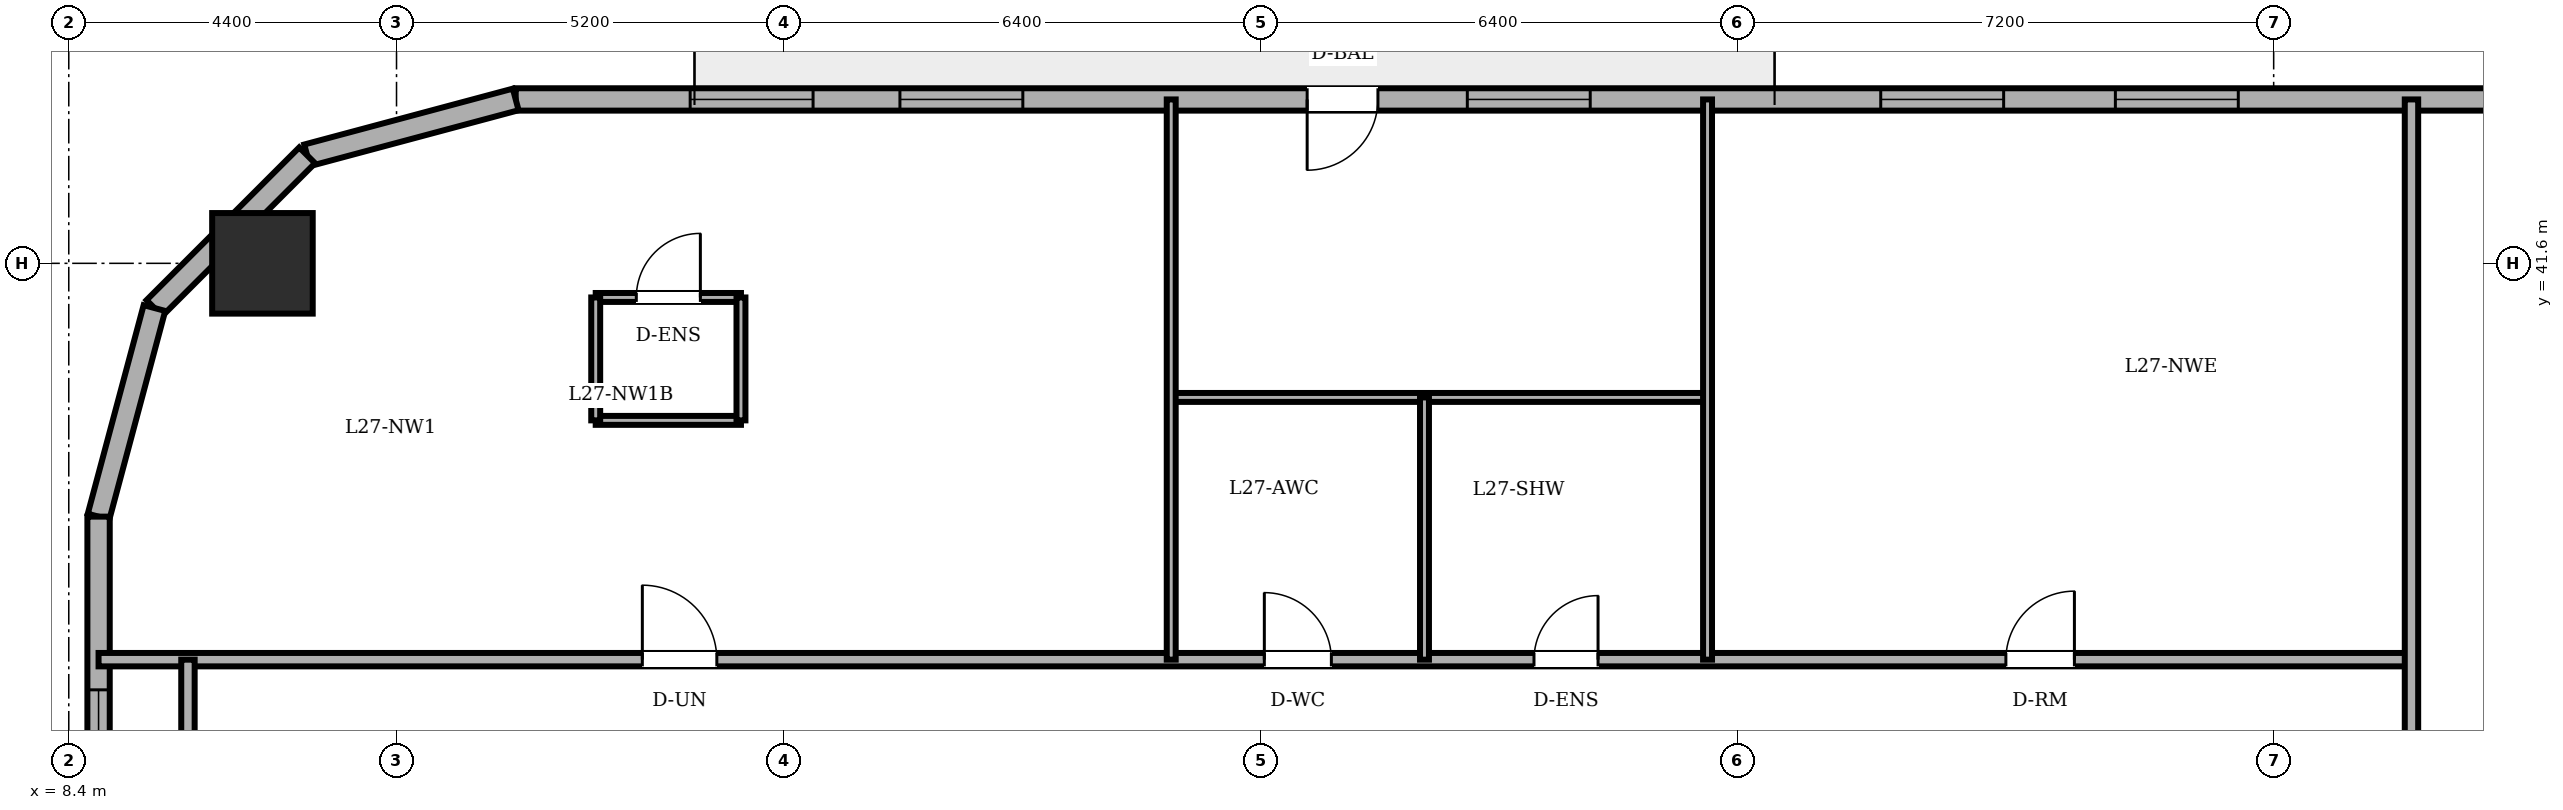
"""IFC4 building model, lengths in metres.
Left out: names, types, materials, properties, quantities, classifications, styles, units other than length and angle.
Written with IfcOpenShell. Run it as: python <this file> out.ifc"""

import sys

from ifc_helpers import new_model, si_unit, direction, frame, frame_2d, origin, origin_2d, place, context, subcontext, project, spatial, rectangle, circle, extrude, element, fill, save


model = new_model("IFC4")
c1 = context("Model", 3, precision=1e-05, world=origin(), true_north=direction((0.0, 1.0)))
c2 = subcontext(c1, "Body", "Model", "MODEL_VIEW")
j1 = project(units=[si_unit("LENGTHUNIT", "METRE"), si_unit("PLANEANGLEUNIT", "RADIAN")], contexts=[c1])
p1 = place(None, origin())
s1 = spatial("IfcSite", under=j1, at=p1, CompositionType="ELEMENT")
p2 = place(p1, origin())
s2 = spatial("IfcBuilding", under=s1, at=p2, CompositionType="ELEMENT")
p3 = place(p2, frame((0.0, 0.0, 104.3)))
s3 = spatial("IfcBuildingStorey", under=s2, at=p3, CompositionType="ELEMENT", Elevation=104.3)
p4 = place(p3, frame((11.0, 41.6, 0.0), z_axis=(0.0, 0.0, 1.0), x_axis=(1.0, 0.0, 0.0)))
e1 = element("IfcColumn", 1, at=p4, inside=s3, PredefinedType="COLUMN", context=c2, shape_type="SweptSolid", body=[
    extrude(circle(Radius=0.675, at=origin_2d()), origin(), (0.0, 0.0, 1.0), 3.6),
])
p5 = place(p3, frame((44.333, 43.8, 0.0), z_axis=(0.0, 0.0, 1.0), x_axis=(-1.0, 0.0, 0.0)))
e2 = element("IfcWall", 2, at=p5, inside=s3, PredefinedType="SOLIDWALL", context=c2, shape_type="SweptSolid", body=[
    extrude(rectangle(XDim=29.933, YDim=0.3, at=frame_2d((14.967, 0.0))), origin(), (0.0, 0.0, 1.0), 3.4),
])
p6 = place(p5, frame((18.358, 0.0, 0.0)))
e3 = element("IfcOpeningElement", 3, at=p6, cuts=e2, PredefinedType="OPENING", context=c2, shape_type="SweptSolid", body=[
    extrude(rectangle(XDim=0.95, YDim=2.2, at=frame_2d((0.475, 1.1))), frame((0.0, 0.16, 0.0), z_axis=(0.0, -1.0, 0.0), x_axis=(1.0, 0.0, 0.0)), (0.0, 0.0, 1.0), 0.32),
])
p7 = place(p5, frame((1.591, 0.0, 0.85)))
e4 = element("IfcOpeningElement", 4, at=p7, cuts=e2, PredefinedType="OPENING", context=c2, shape_type="SweptSolid", body=[
    extrude(rectangle(XDim=1.65, YDim=1.55, at=frame_2d((0.825, 0.775))), frame((0.0, 0.16, 0.0), z_axis=(0.0, -1.0, 0.0), x_axis=(1.0, 0.0, 0.0)), (0.0, 0.0, 1.0), 0.32),
])
p8 = place(p5, frame((6.808, 0.0, 0.85)))
e5 = element("IfcOpeningElement", 5, at=p8, cuts=e2, PredefinedType="OPENING", context=c2, shape_type="SweptSolid", body=[
    extrude(rectangle(XDim=1.65, YDim=1.55, at=frame_2d((0.825, 0.775))), frame((0.0, 0.16, 0.0), z_axis=(0.0, -1.0, 0.0), x_axis=(1.0, 0.0, 0.0)), (0.0, 0.0, 1.0), 0.32),
])
p9 = place(p5, frame((9.958, 0.0, 0.85)))
e6 = element("IfcOpeningElement", 6, at=p9, cuts=e2, PredefinedType="OPENING", context=c2, shape_type="SweptSolid", body=[
    extrude(rectangle(XDim=1.65, YDim=1.55, at=frame_2d((0.825, 0.775))), frame((0.0, 0.16, 0.0), z_axis=(0.0, -1.0, 0.0), x_axis=(1.0, 0.0, 0.0)), (0.0, 0.0, 1.0), 0.32),
])
p10 = place(p5, frame((15.508, 0.0, 0.85)))
e7 = element("IfcOpeningElement", 7, at=p10, cuts=e2, PredefinedType="OPENING", context=c2, shape_type="SweptSolid", body=[
    extrude(rectangle(XDim=1.65, YDim=1.55, at=frame_2d((0.825, 0.775))), frame((0.0, 0.16, 0.0), z_axis=(0.0, -1.0, 0.0), x_axis=(1.0, 0.0, 0.0)), (0.0, 0.0, 1.0), 0.32),
])
p11 = place(p5, frame((23.125, 0.0, 0.85)))
e8 = element("IfcOpeningElement", 8, at=p11, cuts=e2, PredefinedType="OPENING", context=c2, shape_type="SweptSolid", body=[
    extrude(rectangle(XDim=1.65, YDim=1.55, at=frame_2d((0.825, 0.775))), frame((0.0, 0.16, 0.0), z_axis=(0.0, -1.0, 0.0), x_axis=(1.0, 0.0, 0.0)), (0.0, 0.0, 1.0), 0.32),
])
p12 = place(p5, frame((25.941, 0.0, 0.85)))
e9 = element("IfcOpeningElement", 9, at=p12, cuts=e2, PredefinedType="OPENING", context=c2, shape_type="SweptSolid", body=[
    extrude(rectangle(XDim=1.65, YDim=1.55, at=frame_2d((0.825, 0.775))), frame((0.0, 0.16, 0.0), z_axis=(0.0, -1.0, 0.0), x_axis=(1.0, 0.0, 0.0)), (0.0, 0.0, 1.0), 0.32),
])
p13 = place(p3, frame((14.4, 43.8, 0.0), z_axis=(0.0, 0.0, 1.0), x_axis=(-0.965943540406, -0.258752926066, 0.0)))
e10 = element("IfcWall", 10, at=p13, inside=s3, PredefinedType="SOLIDWALL", context=c2, shape_type="SweptSolid", body=[
    extrude(rectangle(XDim=2.898, YDim=0.3, at=frame_2d((1.449, 0.0))), origin(), (0.0, 0.0, 1.0), 3.4),
])
p14 = place(p3, frame((11.6, 43.05, 0.0), z_axis=(0.0, 0.0, 1.0), x_axis=(-0.707106781187, -0.707106781187, 0.0)))
e11 = element("IfcWall", 11, at=p14, inside=s3, PredefinedType="SOLIDWALL", context=c2, shape_type="SweptSolid", body=[
    extrude(rectangle(XDim=2.899, YDim=0.3, at=frame_2d((1.45, 0.0))), origin(), (0.0, 0.0, 1.0), 3.4),
])
p15 = place(p3, frame((9.55, 41.0, 0.0), z_axis=(0.0, 0.0, 1.0), x_axis=(-0.258731875344, -0.96594917914, 0.0)))
e12 = element("IfcWall", 12, at=p15, inside=s3, PredefinedType="SOLIDWALL", context=c2, shape_type="SweptSolid", body=[
    extrude(rectangle(XDim=2.899, YDim=0.3, at=frame_2d((1.449, 0.0))), origin(), (0.0, 0.0, 1.0), 3.4),
])
p16 = place(p3, frame((8.8, 38.2, 0.0), z_axis=(0.0, 0.0, 1.0), x_axis=(0.0, -1.0, 0.0)))
e13 = element("IfcWall", 13, at=p16, inside=s3, PredefinedType="SOLIDWALL", context=c2, shape_type="SweptSolid", body=[
    extrude(rectangle(XDim=28.4, YDim=0.3, at=frame_2d((14.2, 0.0))), origin(), (0.0, 0.0, 1.0), 3.4),
])
p17 = place(p16, frame((2.325, 0.0, 0.85)))
e14 = element("IfcOpeningElement", 14, at=p17, cuts=e13, PredefinedType="OPENING", context=c2, shape_type="SweptSolid", body=[
    extrude(rectangle(XDim=1.65, YDim=1.55, at=frame_2d((0.825, 0.775))), frame((0.0, 0.16, 0.0), z_axis=(0.0, -1.0, 0.0), x_axis=(1.0, 0.0, 0.0)), (0.0, 0.0, 1.0), 0.32),
])
p18 = place(p16, frame((7.328, 0.0, 0.85)))
e15 = element("IfcOpeningElement", 15, at=p18, cuts=e13, PredefinedType="OPENING", context=c2, shape_type="SweptSolid", body=[
    extrude(rectangle(XDim=1.65, YDim=1.55, at=frame_2d((0.825, 0.775))), frame((0.0, 0.16, 0.0), z_axis=(0.0, -1.0, 0.0), x_axis=(1.0, 0.0, 0.0)), (0.0, 0.0, 1.0), 0.32),
])
p19 = place(p16, frame((11.102, 0.0, 0.85)))
e16 = element("IfcOpeningElement", 16, at=p19, cuts=e13, PredefinedType="OPENING", context=c2, shape_type="SweptSolid", body=[
    extrude(rectangle(XDim=1.65, YDim=1.55, at=frame_2d((0.825, 0.775))), frame((0.0, 0.16, 0.0), z_axis=(0.0, -1.0, 0.0), x_axis=(1.0, 0.0, 0.0)), (0.0, 0.0, 1.0), 0.32),
])
p20 = place(p16, frame((17.648, 0.0, 0.85)))
e17 = element("IfcOpeningElement", 17, at=p20, cuts=e13, PredefinedType="OPENING", context=c2, shape_type="SweptSolid", body=[
    extrude(rectangle(XDim=1.65, YDim=1.55, at=frame_2d((0.825, 0.775))), frame((0.0, 0.16, 0.0), z_axis=(0.0, -1.0, 0.0), x_axis=(1.0, 0.0, 0.0)), (0.0, 0.0, 1.0), 0.32),
])
p21 = place(p16, frame((20.422, 0.0, 0.85)))
e18 = element("IfcOpeningElement", 18, at=p21, cuts=e13, PredefinedType="OPENING", context=c2, shape_type="SweptSolid", body=[
    extrude(rectangle(XDim=1.65, YDim=1.55, at=frame_2d((0.825, 0.775))), frame((0.0, 0.16, 0.0), z_axis=(0.0, -1.0, 0.0), x_axis=(1.0, 0.0, 0.0)), (0.0, 0.0, 1.0), 0.32),
])
p22 = place(p16, frame((24.425, 0.0, 0.85)))
e19 = element("IfcOpeningElement", 19, at=p22, cuts=e13, PredefinedType="OPENING", context=c2, shape_type="SweptSolid", body=[
    extrude(rectangle(XDim=1.65, YDim=1.55, at=frame_2d((0.825, 0.775))), frame((0.0, 0.16, 0.0), z_axis=(0.0, -1.0, 0.0), x_axis=(1.0, 0.0, 0.0)), (0.0, 0.0, 1.0), 0.32),
])
p23 = place(p3, frame((15.474, 41.142, 0.0), z_axis=(0.0, 0.0, 1.0), x_axis=(1.0, 0.0, 0.0)))
e20 = element("IfcWall", 20, at=p23, inside=s3, PredefinedType="PARTITIONING", context=c2, shape_type="SweptSolid", body=[
    extrude(rectangle(XDim=1.95, YDim=0.12, at=frame_2d((0.975, 0.0))), origin(), (0.0, 0.0, 1.0), 3.4),
])
p24 = place(p23, frame((0.545, 0.0, 0.0)))
e21 = element("IfcOpeningElement", 21, at=p24, cuts=e20, PredefinedType="OPENING", context=c2, shape_type="SweptSolid", body=[
    extrude(rectangle(XDim=0.86, YDim=2.1, at=frame_2d((0.43, 1.05))), frame((0.0, 0.07, 0.0), z_axis=(0.0, -1.0, 0.0), x_axis=(1.0, 0.0, 0.0)), (0.0, 0.0, 1.0), 0.14),
])
p25 = place(p3, frame((17.424, 39.492, 0.0), z_axis=(0.0, 0.0, 1.0), x_axis=(-1.0, 0.0, 0.0)))
e22 = element("IfcWall", 22, at=p25, inside=s3, PredefinedType="PARTITIONING", context=c2, shape_type="SweptSolid", body=[
    extrude(rectangle(XDim=1.95, YDim=0.12, at=frame_2d((0.975, 0.0))), origin(), (0.0, 0.0, 1.0), 3.4),
])
for number, where, z_axis, x_axis in (
    (23, (15.474, 41.142, 0.0), (0.0, 0.0, 1.0), (0.0, -1.0, 0.0)),
    (24, (17.424, 39.492, 0.0), (0.0, 0.0, 1.0), (0.0, 1.0, 0.0)),
):
    element("IfcWall", number, at=place(p3, frame(where, z_axis=z_axis, x_axis=x_axis)), inside=s3, PredefinedType="PARTITIONING", context=c2, shape_type="SweptSolid", body=[
        extrude(rectangle(XDim=1.65, YDim=0.12, at=frame_2d((0.825, 0.0))), origin(), (0.0, 0.0, 1.0), 3.4),
    ])
p26 = place(p3, frame((8.8, 36.28, 0.0), z_axis=(0.0, 0.0, 1.0), x_axis=(1.0, 0.0, 0.0)))
e25 = element("IfcWall", 25, at=p26, inside=s3, PredefinedType="PARTITIONING", context=c2, shape_type="SweptSolid", body=[
    extrude(rectangle(XDim=31.05, YDim=0.18, at=frame_2d((15.525, 0.0))), origin(), (0.0, 0.0, 1.0), 3.4),
])
p27 = place(p26, frame((15.65, 0.0, 0.0)))
e26 = element("IfcOpeningElement", 26, at=p27, cuts=e25, PredefinedType="OPENING", context=c2, shape_type="SweptSolid", body=[
    extrude(rectangle(XDim=0.9, YDim=2.1, at=frame_2d((0.45, 1.05))), frame((0.0, 0.1, 0.0), z_axis=(0.0, -1.0, 0.0), x_axis=(1.0, 0.0, 0.0)), (0.0, 0.0, 1.0), 0.2),
])
p28 = place(p26, frame((19.27, 0.0, 0.0)))
e27 = element("IfcOpeningElement", 27, at=p28, cuts=e25, PredefinedType="OPENING", context=c2, shape_type="SweptSolid", body=[
    extrude(rectangle(XDim=0.86, YDim=2.1, at=frame_2d((0.43, 1.05))), frame((0.0, 0.1, 0.0), z_axis=(0.0, -1.0, 0.0), x_axis=(1.0, 0.0, 0.0)), (0.0, 0.0, 1.0), 0.2),
])
p29 = place(p26, frame((7.3, 0.0, 0.0)))
e28 = element("IfcOpeningElement", 28, at=p29, cuts=e25, PredefinedType="OPENING", context=c2, shape_type="SweptSolid", body=[
    extrude(rectangle(XDim=1.0, YDim=2.15, at=frame_2d((0.5, 1.075))), frame((0.0, 0.1, 0.0), z_axis=(0.0, -1.0, 0.0), x_axis=(1.0, 0.0, 0.0)), (0.0, 0.0, 1.0), 0.2),
])
p30 = place(p26, frame((25.605, 0.0, 0.0)))
e29 = element("IfcOpeningElement", 29, at=p30, cuts=e25, PredefinedType="OPENING", context=c2, shape_type="SweptSolid", body=[
    extrude(rectangle(XDim=0.92, YDim=2.1, at=frame_2d((0.46, 1.05))), frame((0.0, 0.1, 0.0), z_axis=(0.0, -1.0, 0.0), x_axis=(1.0, 0.0, 0.0)), (0.0, 0.0, 1.0), 0.2),
])
p31 = place(p3, frame((23.2, 39.8, 0.0), z_axis=(0.0, 0.0, 1.0), x_axis=(1.0, 0.0, 0.0)))
e30 = element("IfcWall", 30, at=p31, inside=s3, PredefinedType="PARTITIONING", context=c2, shape_type="SweptSolid", body=[
    extrude(rectangle(XDim=7.2, YDim=0.12, at=frame_2d((3.6, 0.0))), origin(), (0.0, 0.0, 1.0), 3.4),
])
p32 = place(p3, frame((10.0, 33.82, 0.0), z_axis=(0.0, 0.0, 1.0), x_axis=(0.0, 1.0, 0.0)))
e31 = element("IfcWall", 31, at=p32, inside=s3, PredefinedType="PARTITIONING", context=c2, shape_type="SweptSolid", body=[
    extrude(rectangle(XDim=2.46, YDim=0.18, at=frame_2d((1.23, 0.0))), origin(), (0.0, 0.0, 1.0), 3.4),
])
p33 = place(p3, frame((23.2, 36.28, 0.0), z_axis=(0.0, 0.0, 1.0), x_axis=(0.0, 1.0, 0.0)))
e32 = element("IfcWall", 32, at=p33, inside=s3, PredefinedType="PARTITIONING", context=c2, shape_type="SweptSolid", body=[
    extrude(rectangle(XDim=7.52, YDim=0.12, at=frame_2d((3.76, 0.0))), origin(), (0.0, 0.0, 1.0), 3.4),
])
p34 = place(p3, frame((26.6, 36.28, 0.0), z_axis=(0.0, 0.0, 1.0), x_axis=(0.0, 1.0, 0.0)))
e33 = element("IfcWall", 33, at=p34, inside=s3, PredefinedType="PARTITIONING", context=c2, shape_type="SweptSolid", body=[
    extrude(rectangle(XDim=3.52, YDim=0.12, at=frame_2d((1.76, 0.0))), origin(), (0.0, 0.0, 1.0), 3.4),
])
p35 = place(p3, frame((30.4, 36.28, 0.0), z_axis=(0.0, 0.0, 1.0), x_axis=(0.0, 1.0, 0.0)))
e34 = element("IfcWall", 34, at=p35, inside=s3, PredefinedType="PARTITIONING", context=c2, shape_type="SweptSolid", body=[
    extrude(rectangle(XDim=7.52, YDim=0.12, at=frame_2d((3.76, 0.0))), origin(), (0.0, 0.0, 1.0), 3.4),
])
p36 = place(p3, frame((39.85, 25.18, 0.0), z_axis=(0.0, 0.0, 1.0), x_axis=(0.0, 1.0, 0.0)))
e35 = element("IfcWall", 35, at=p36, inside=s3, PredefinedType="PARTITIONING", context=c2, shape_type="SweptSolid", body=[
    extrude(rectangle(XDim=18.62, YDim=0.18, at=frame_2d((9.31, 0.0))), origin(), (0.0, 0.0, 1.0), 3.4),
])
p37 = place(p36, frame((5.35, 0.0, 0.0)))
e36 = element("IfcOpeningElement", 36, at=p37, cuts=e35, PredefinedType="OPENING", context=c2, shape_type="SweptSolid", body=[
    extrude(rectangle(XDim=0.92, YDim=2.1, at=frame_2d((0.46, 1.05))), frame((0.0, 0.1, 0.0), z_axis=(0.0, -1.0, 0.0), x_axis=(1.0, 0.0, 0.0)), (0.0, 0.0, 1.0), 0.2),
])
p38 = place(p6, origin())
e37 = element("IfcDoor", 37, at=p38, inside=s3, OperationType="SINGLE_SWING_RIGHT", PredefinedType="DOOR", context=c2, shape_type="SweptSolid", body=[
    extrude(rectangle(XDim=0.95, YDim=2.2, at=frame_2d((0.475, 1.1))), frame((0.0, 0.025, 0.0), z_axis=(0.0, -1.0, 0.0), x_axis=(1.0, 0.0, 0.0)), (0.0, 0.0, 1.0), 0.05),
])
fill(e3, e37)
p39 = place(p8, origin())
e38 = element("IfcWindow", 38, at=p39, inside=s3, PartitioningType="DOUBLE_PANEL_VERTICAL", PredefinedType="WINDOW", context=c2, shape_type="SweptSolid", body=[
    extrude(rectangle(XDim=1.65, YDim=1.55, at=frame_2d((0.825, 0.775))), frame((0.0, 0.03, 0.0), z_axis=(0.0, -1.0, 0.0), x_axis=(1.0, 0.0, 0.0)), (0.0, 0.0, 1.0), 0.06),
])
fill(e5, e38)
p40 = place(p9, origin())
e39 = element("IfcWindow", 39, at=p40, inside=s3, PartitioningType="DOUBLE_PANEL_VERTICAL", PredefinedType="WINDOW", context=c2, shape_type="SweptSolid", body=[
    extrude(rectangle(XDim=1.65, YDim=1.55, at=frame_2d((0.825, 0.775))), frame((0.0, 0.03, 0.0), z_axis=(0.0, -1.0, 0.0), x_axis=(1.0, 0.0, 0.0)), (0.0, 0.0, 1.0), 0.06),
])
fill(e6, e39)
p41 = place(p10, origin())
e40 = element("IfcWindow", 40, at=p41, inside=s3, PartitioningType="DOUBLE_PANEL_VERTICAL", PredefinedType="WINDOW", context=c2, shape_type="SweptSolid", body=[
    extrude(rectangle(XDim=1.65, YDim=1.55, at=frame_2d((0.825, 0.775))), frame((0.0, 0.03, 0.0), z_axis=(0.0, -1.0, 0.0), x_axis=(1.0, 0.0, 0.0)), (0.0, 0.0, 1.0), 0.06),
])
fill(e7, e40)
p42 = place(p11, origin())
e41 = element("IfcWindow", 41, at=p42, inside=s3, PartitioningType="DOUBLE_PANEL_VERTICAL", PredefinedType="WINDOW", context=c2, shape_type="SweptSolid", body=[
    extrude(rectangle(XDim=1.65, YDim=1.55, at=frame_2d((0.825, 0.775))), frame((0.0, 0.03, 0.0), z_axis=(0.0, -1.0, 0.0), x_axis=(1.0, 0.0, 0.0)), (0.0, 0.0, 1.0), 0.06),
])
fill(e8, e41)
p43 = place(p12, origin())
e42 = element("IfcWindow", 42, at=p43, inside=s3, PartitioningType="DOUBLE_PANEL_VERTICAL", PredefinedType="WINDOW", context=c2, shape_type="SweptSolid", body=[
    extrude(rectangle(XDim=1.65, YDim=1.55, at=frame_2d((0.825, 0.775))), frame((0.0, 0.03, 0.0), z_axis=(0.0, -1.0, 0.0), x_axis=(1.0, 0.0, 0.0)), (0.0, 0.0, 1.0), 0.06),
])
fill(e9, e42)
p44 = place(p17, origin())
e43 = element("IfcWindow", 43, at=p44, inside=s3, PartitioningType="DOUBLE_PANEL_VERTICAL", PredefinedType="WINDOW", context=c2, shape_type="SweptSolid", body=[
    extrude(rectangle(XDim=1.65, YDim=1.55, at=frame_2d((0.825, 0.775))), frame((0.0, 0.03, 0.0), z_axis=(0.0, -1.0, 0.0), x_axis=(1.0, 0.0, 0.0)), (0.0, 0.0, 1.0), 0.06),
])
fill(e14, e43)
p45 = place(p24, origin())
e44 = element("IfcDoor", 44, at=p45, inside=s3, OperationType="SINGLE_SWING_RIGHT", PredefinedType="DOOR", context=c2, shape_type="SweptSolid", body=[
    extrude(rectangle(XDim=0.86, YDim=2.1, at=frame_2d((0.43, 1.05))), frame((0.0, 0.025, 0.0), z_axis=(0.0, -1.0, 0.0), x_axis=(1.0, 0.0, 0.0)), (0.0, 0.0, 1.0), 0.05),
])
fill(e21, e44)
p46 = place(p27, origin())
e45 = element("IfcDoor", 45, at=p46, inside=s3, OperationType="SINGLE_SWING_LEFT", PredefinedType="DOOR", context=c2, shape_type="SweptSolid", body=[
    extrude(rectangle(XDim=0.9, YDim=2.1, at=frame_2d((0.45, 1.05))), frame((0.0, 0.025, 0.0), z_axis=(0.0, -1.0, 0.0), x_axis=(1.0, 0.0, 0.0)), (0.0, 0.0, 1.0), 0.05),
])
fill(e26, e45)
p47 = place(p28, origin())
e46 = element("IfcDoor", 46, at=p47, inside=s3, OperationType="SINGLE_SWING_RIGHT", PredefinedType="DOOR", context=c2, shape_type="SweptSolid", body=[
    extrude(rectangle(XDim=0.86, YDim=2.1, at=frame_2d((0.43, 1.05))), frame((0.0, 0.025, 0.0), z_axis=(0.0, -1.0, 0.0), x_axis=(1.0, 0.0, 0.0)), (0.0, 0.0, 1.0), 0.05),
])
fill(e27, e46)
p48 = place(p29, origin())
e47 = element("IfcDoor", 47, at=p48, inside=s3, OperationType="SINGLE_SWING_LEFT", PredefinedType="DOOR", context=c2, shape_type="SweptSolid", body=[
    extrude(rectangle(XDim=1.0, YDim=2.15, at=frame_2d((0.5, 1.075))), frame((0.0, 0.025, 0.0), z_axis=(0.0, -1.0, 0.0), x_axis=(1.0, 0.0, 0.0)), (0.0, 0.0, 1.0), 0.05),
])
fill(e28, e47)
p49 = place(p30, origin())
e48 = element("IfcDoor", 48, at=p49, inside=s3, OperationType="SINGLE_SWING_RIGHT", PredefinedType="DOOR", context=c2, shape_type="SweptSolid", body=[
    extrude(rectangle(XDim=0.92, YDim=2.1, at=frame_2d((0.46, 1.05))), frame((0.0, 0.025, 0.0), z_axis=(0.0, -1.0, 0.0), x_axis=(1.0, 0.0, 0.0)), (0.0, 0.0, 1.0), 0.05),
])
fill(e29, e48)
save(model, sys.argv[1])
